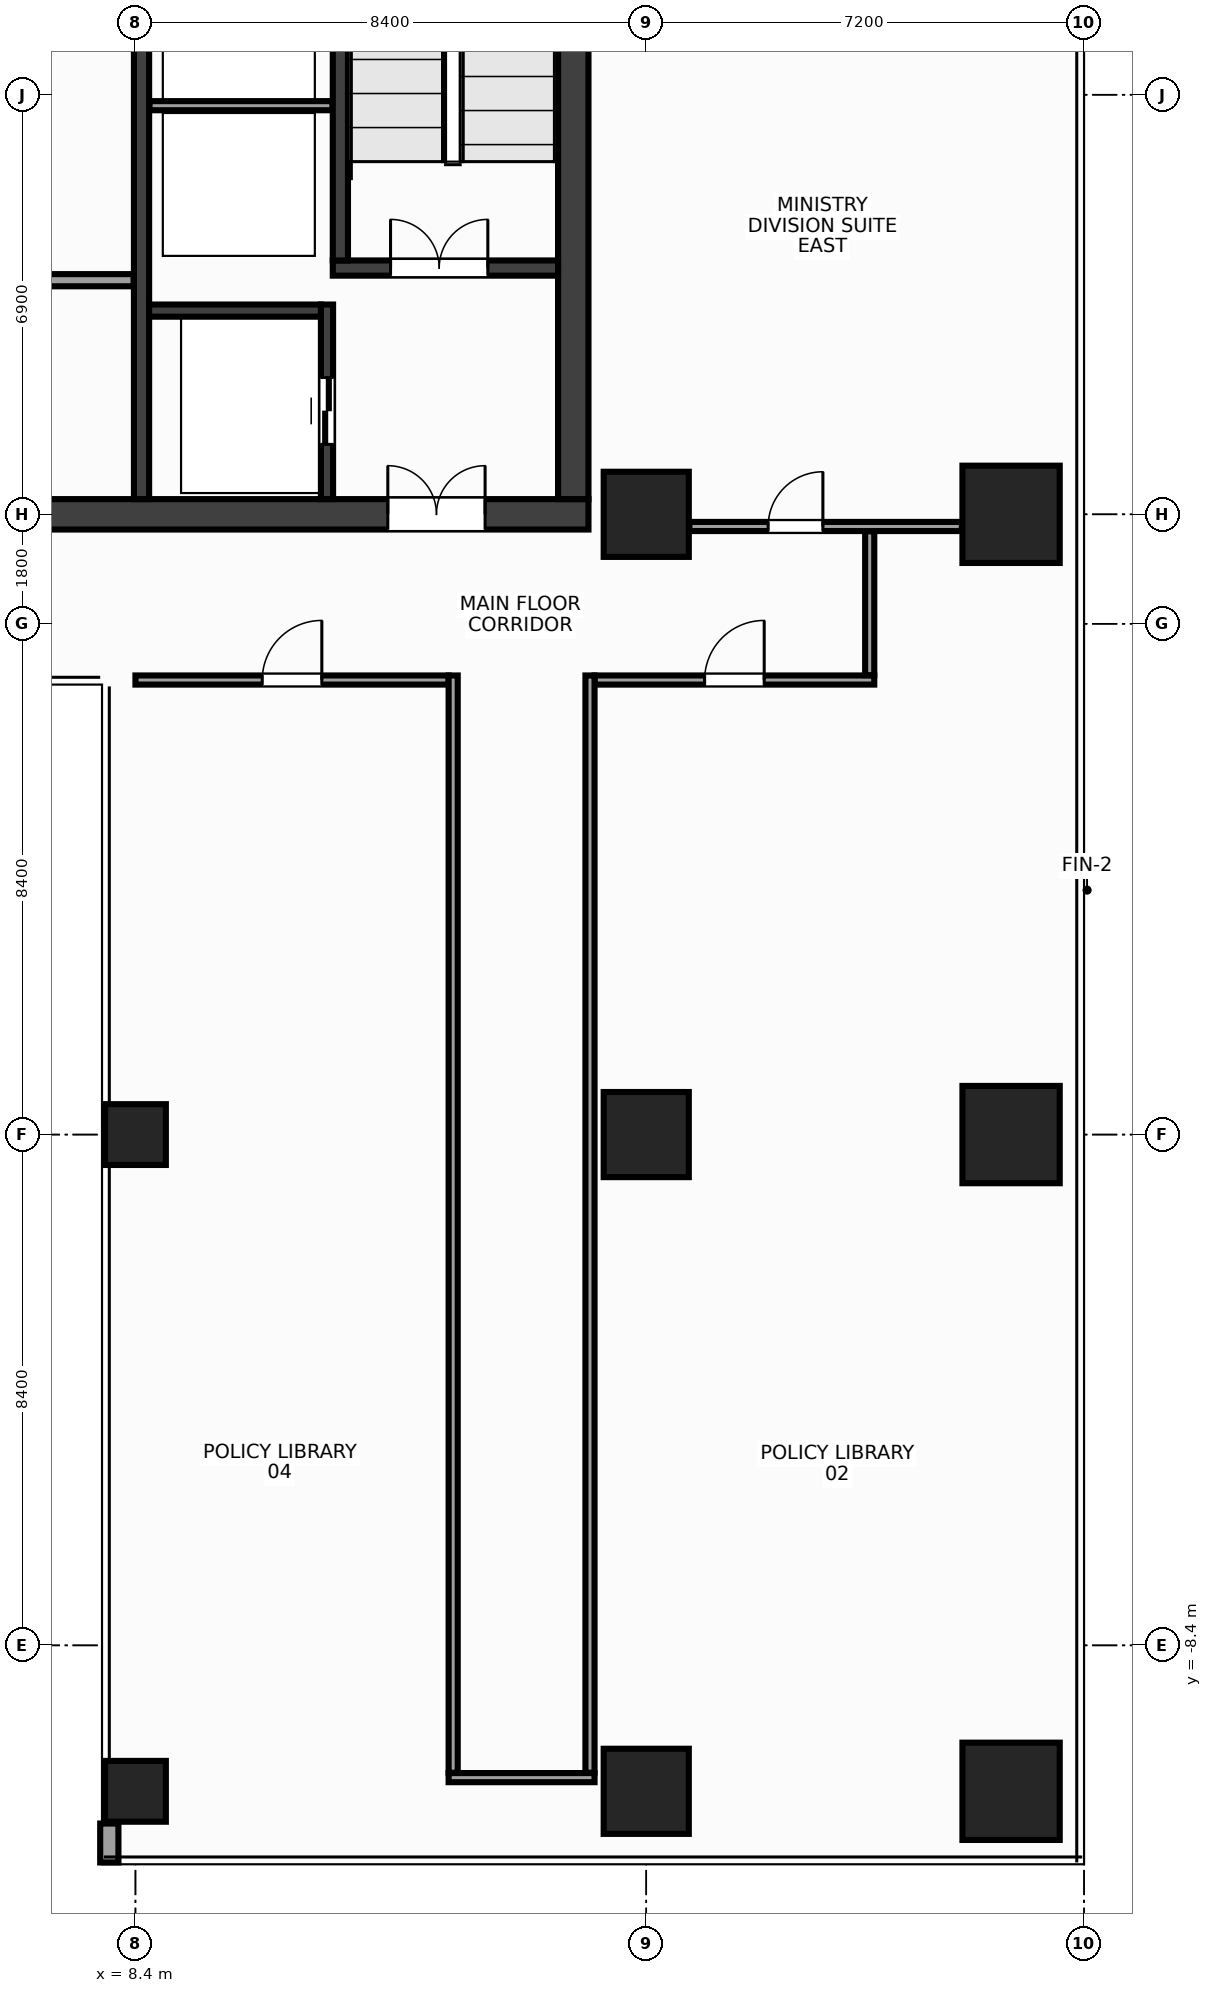
"""IFC4 building model, lengths in metres.
Left out: names, types, materials, properties, quantities, classifications, styles, units other than length and angle.
Written with IfcOpenShell. Run it as: python <this file> out.ifc"""

import sys

from ifc_helpers import new_model, si_unit, direction, frame, frame_2d, origin, origin_2d, place, context, subcontext, project, spatial, rectangle, hollow_rectangle, extrude, source, transform, mapped, element, fill, save


model = new_model("IFC4")
c1 = context("Model", 3, precision=1e-05, world=origin(), true_north=direction((0.0, 1.0)))
c2 = subcontext(c1, "Body", "Model", "MODEL_VIEW")
j1 = project(units=[si_unit("LENGTHUNIT", "METRE"), si_unit("PLANEANGLEUNIT", "RADIAN")], contexts=[c1])
p1 = place(None, origin())
s1 = spatial("IfcSite", under=j1, at=p1, CompositionType="ELEMENT")
p2 = place(p1, origin())
s2 = spatial("IfcBuilding", under=s1, at=p2, CompositionType="ELEMENT")
p3 = place(p2, frame((0.0, 0.0, 210.8)))
s3 = spatial("IfcBuildingStorey", under=s2, at=p3, CompositionType="ELEMENT", Elevation=210.8)
m1 = source(origin(), c2, "Body", "SweptSolid", [
    extrude(rectangle(XDim=31.7, YDim=0.5, at=frame_2d((15.85, 0.0))), origin(), (0.0, 0.0, 1.0), 3.6),
])
p4 = place(p3, frame((-15.85, 10.2, 0.0), z_axis=(0.0, 0.0, 1.0), x_axis=(1.0, 0.0, 0.0)))
e1 = element("IfcWall", 1, at=p4, inside=s3, PredefinedType="SHEAR", context=c2, shape_type="MappedRepresentation", body=[
    mapped(m1, transform((0.0, 0.0, 0.0), x_axis=(1.0, 0.0, 0.0), y_axis=(0.0, 1.0, 0.0), z_axis=(0.0, 0.0, 1.0), scale=1.0)),
])
p5 = place(p4, frame((1.7, 0.0, 0.0)))
e2 = element("IfcOpeningElement", 2, at=p5, cuts=e1, PredefinedType="OPENING", context=c2, shape_type="SweptSolid", body=[
    extrude(rectangle(XDim=1.6, YDim=2.15, at=frame_2d((0.8, 1.075))), frame((0.0, 0.262, 0.0), z_axis=(0.0, -1.0, 0.0), x_axis=(1.0, 0.0, 0.0)), (0.0, 0.0, 1.0), 0.524),
])
p6 = place(p4, frame((28.4, 0.0, 0.0)))
e3 = element("IfcOpeningElement", 3, at=p6, cuts=e1, PredefinedType="OPENING", context=c2, shape_type="SweptSolid", body=[
    extrude(rectangle(XDim=1.6, YDim=2.15, at=frame_2d((0.8, 1.075))), frame((0.0, 0.262, 0.0), z_axis=(0.0, -1.0, 0.0), x_axis=(1.0, 0.0, 0.0)), (0.0, 0.0, 1.0), 0.524),
])
p7 = place(p4, frame((15.1, 0.0, 0.0)))
e4 = element("IfcOpeningElement", 4, at=p7, cuts=e1, PredefinedType="OPENING", context=c2, shape_type="SweptSolid", body=[
    extrude(rectangle(XDim=1.5, YDim=2.2, at=frame_2d((0.75, 1.1))), frame((0.0, 0.262, 0.0), z_axis=(0.0, -1.0, 0.0), x_axis=(1.0, 0.0, 0.0)), (0.0, 0.0, 1.0), 0.524),
])
m2 = source(origin(), c2, "Body", "SweptSolid", [
    extrude(rectangle(XDim=13.1, YDim=0.5, at=frame_2d((6.55, 0.0))), origin(), (0.0, 0.0, 1.0), 3.6),
])
p8 = place(p3, frame((15.6, 10.45, 0.0), z_axis=(0.0, 0.0, 1.0), x_axis=(0.0, 1.0, 0.0)))
e5 = element("IfcWall", 5, at=p8, inside=s3, PredefinedType="SHEAR", context=c2, shape_type="MappedRepresentation", body=[
    mapped(m2, transform((0.0, 0.0, 0.0), x_axis=(1.0, 0.0, 0.0), y_axis=(0.0, 1.0, 0.0), z_axis=(0.0, 0.0, 1.0), scale=1.0)),
])
m3 = source(origin(), c2, "Body", "SweptSolid", [
    extrude(rectangle(XDim=13.1, YDim=0.25, at=frame_2d((6.55, 0.0))), origin(), (0.0, 0.0, 1.0), 3.6),
])
p9 = place(p3, frame((8.5, 10.45, 0.0), z_axis=(0.0, 0.0, 1.0), x_axis=(0.0, 1.0, 0.0)))
e6 = element("IfcWall", 6, at=p9, inside=s3, PredefinedType="SHEAR", context=c2, shape_type="MappedRepresentation", body=[
    mapped(m3, transform((0.0, 0.0, 0.0), x_axis=(1.0, 0.0, 0.0), y_axis=(0.0, 1.0, 0.0), z_axis=(0.0, 0.0, 1.0), scale=1.0)),
])
p10 = place(p9, frame((10.0, 0.0, 0.0)))
e7 = element("IfcOpeningElement", 7, at=p10, cuts=e6, PredefinedType="OPENING", context=c2, shape_type="SweptSolid", body=[
    extrude(rectangle(XDim=0.95, YDim=2.15, at=frame_2d((0.475, 1.075))), frame((0.0, 0.137, 0.0), z_axis=(0.0, -1.0, 0.0), x_axis=(1.0, 0.0, 0.0)), (0.0, 0.0, 1.0), 0.274),
])
m4 = source(origin(), c2, "Body", "SweptSolid", [
    extrude(rectangle(XDim=3.705, YDim=0.25, at=frame_2d((1.853, 0.0))), origin(), (0.0, 0.0, 1.0), 3.6),
])
p11 = place(p3, frame((11.645, 14.25, 0.0), z_axis=(0.0, 0.0, 1.0), x_axis=(1.0, 0.0, 0.0)))
e8 = element("IfcWall", 8, at=p11, inside=s3, PredefinedType="SHEAR", context=c2, shape_type="MappedRepresentation", body=[
    mapped(m4, transform((0.0, 0.0, 0.0), x_axis=(1.0, 0.0, 0.0), y_axis=(0.0, 1.0, 0.0), z_axis=(0.0, 0.0, 1.0), scale=1.0)),
])
p12 = place(p11, frame((0.95, 0.0, 0.0)))
e9 = element("IfcOpeningElement", 9, at=p12, cuts=e8, PredefinedType="OPENING", context=c2, shape_type="SweptSolid", body=[
    extrude(rectangle(XDim=1.6, YDim=2.15, at=frame_2d((0.8, 1.075))), frame((0.0, 0.137, 0.0), z_axis=(0.0, -1.0, 0.0), x_axis=(1.0, 0.0, 0.0)), (0.0, 0.0, 1.0), 0.274),
])
m5 = source(origin(), c2, "Body", "SweptSolid", [
    extrude(rectangle(XDim=9.175, YDim=0.25, at=frame_2d((4.587, 0.0))), origin(), (0.0, 0.0, 1.0), 3.6),
])
p13 = place(p3, frame((11.77, 14.375, 0.0), z_axis=(0.0, 0.0, 1.0), x_axis=(0.0, 1.0, 0.0)))
e10 = element("IfcWall", 10, at=p13, inside=s3, PredefinedType="SHEAR", context=c2, shape_type="MappedRepresentation", body=[
    mapped(m5, transform((0.0, 0.0, 0.0), x_axis=(1.0, 0.0, 0.0), y_axis=(0.0, 1.0, 0.0), z_axis=(0.0, 0.0, 1.0), scale=1.0)),
])
m6 = source(origin(), c2, "Body", "SweptSolid", [
    extrude(rectangle(XDim=3.2, YDim=0.2, at=frame_2d((1.6, 0.0))), origin(), (0.0, 0.0, 1.0), 3.6),
])
p14 = place(p3, frame((11.55, 10.45, 0.0), z_axis=(0.0, 0.0, 1.0), x_axis=(0.0, 1.0, 0.0)))
e11 = element("IfcWall", 11, at=p14, inside=s3, PredefinedType="SHEAR", context=c2, shape_type="MappedRepresentation", body=[
    mapped(m6, transform((0.0, 0.0, 0.0), x_axis=(1.0, 0.0, 0.0), y_axis=(0.0, 1.0, 0.0), z_axis=(0.0, 0.0, 1.0), scale=1.0)),
])
p15 = place(p14, frame((0.9, 0.0, 0.0)))
e12 = element("IfcOpeningElement", 12, at=p15, cuts=e11, PredefinedType="OPENING", context=c2, shape_type="SweptSolid", body=[
    extrude(rectangle(XDim=1.1, YDim=2.15, at=frame_2d((0.55, 1.075))), frame((0.0, 0.112, 0.0), z_axis=(0.0, -1.0, 0.0), x_axis=(1.0, 0.0, 0.0)), (0.0, 0.0, 1.0), 0.224),
])
m7 = source(origin(), c2, "Body", "SweptSolid", [
    extrude(rectangle(XDim=2.825, YDim=0.2, at=frame_2d((1.413, 0.0))), origin(), (0.0, 0.0, 1.0), 3.6),
])
p16 = place(p3, frame((8.625, 13.55, 0.0), z_axis=(0.0, 0.0, 1.0), x_axis=(1.0, 0.0, 0.0)))
e13 = element("IfcWall", 13, at=p16, inside=s3, PredefinedType="SHEAR", context=c2, shape_type="MappedRepresentation", body=[
    mapped(m7, transform((0.0, 0.0, 0.0), x_axis=(1.0, 0.0, 0.0), y_axis=(0.0, 1.0, 0.0), z_axis=(0.0, 0.0, 1.0), scale=1.0)),
])
m8 = source(origin(), c2, "Body", "SweptSolid", [
    extrude(rectangle(XDim=1.4, YDim=1.4, at=origin_2d()), origin(), (0.0, 0.0, 1.0), 3.6),
])
for number, where, z_axis, x_axis in (
    (14, (16.8, -10.8, 0.0), (0.0, 0.0, 1.0), (1.0, 0.0, 0.0)),
    (15, (16.8, 0.0, 0.0), (0.0, 0.0, 1.0), (1.0, 0.0, 0.0)),
    (16, (16.8, 10.2, 0.0), (0.0, 0.0, 1.0), (1.0, 0.0, 0.0)),
):
    element("IfcColumn", number, at=place(p3, frame(where, z_axis=z_axis, x_axis=x_axis)), inside=s3, PredefinedType="COLUMN", context=c2, shape_type="MappedRepresentation", body=[
        mapped(m8, transform((0.0, 0.0, 0.0), x_axis=(1.0, 0.0, 0.0), y_axis=(0.0, 1.0, 0.0), z_axis=(0.0, 0.0, 1.0), scale=1.0)),
    ])
m9 = source(origin(), c2, "Body", "SweptSolid", [
    extrude(rectangle(XDim=1.6, YDim=1.6, at=origin_2d()), origin(), (0.0, 0.0, 1.0), 3.6),
])
for number, where, z_axis, x_axis in (
    (17, (22.8, -10.8, 0.0), (0.0, 0.0, 1.0), (1.0, 0.0, 0.0)),
    (18, (22.8, 0.0, 0.0), (0.0, 0.0, 1.0), (1.0, 0.0, 0.0)),
    (19, (22.8, 10.2, 0.0), (0.0, 0.0, 1.0), (1.0, 0.0, 0.0)),
):
    element("IfcColumn", number, at=place(p3, frame(where, z_axis=z_axis, x_axis=x_axis)), inside=s3, PredefinedType="COLUMN", context=c2, shape_type="MappedRepresentation", body=[
        mapped(m9, transform((0.0, 0.0, 0.0), x_axis=(1.0, 0.0, 0.0), y_axis=(0.0, 1.0, 0.0), z_axis=(0.0, 0.0, 1.0), scale=1.0)),
    ])
m10 = source(origin(), c2, "Body", "SweptSolid", [
    extrude(hollow_rectangle(XDim=1.0, YDim=1.0, WallThickness=0.045, at=origin_2d()), origin(), (0.0, 0.0, 1.0), 3.6),
])
for number, where, z_axis, x_axis in (
    (20, (8.4, 0.0, 0.0), (0.0, 0.0, 1.0), (1.0, 0.0, 0.0)),
    (21, (8.4, -10.8, 0.0), (0.0, 0.0, 1.0), (1.0, 0.0, 0.0)),
):
    element("IfcColumn", number, at=place(p3, frame(where, z_axis=z_axis, x_axis=x_axis)), inside=s3, PredefinedType="COLUMN", context=c2, shape_type="MappedRepresentation", body=[
        mapped(m10, transform((0.0, 0.0, 0.0), x_axis=(1.0, 0.0, 0.0), y_axis=(0.0, 1.0, 0.0), z_axis=(0.0, 0.0, 1.0), scale=1.0)),
    ])
m11 = source(origin(), c2, "Body", "SweptSolid", [
    extrude(rectangle(XDim=0.64, YDim=0.24, at=frame_2d((0.32, 0.0))), origin(), (0.0, 0.0, 1.0), 2.76),
])
p17 = place(p3, frame((7.97, -11.33, 0.0), z_axis=(0.0, 0.0, 1.0), x_axis=(0.0, -1.0, 0.0)))
e22 = element("IfcWall", 22, at=p17, inside=s3, PredefinedType="STANDARD", context=c2, shape_type="MappedRepresentation", body=[
    mapped(m11, transform((0.0, 0.0, 0.0), x_axis=(1.0, 0.0, 0.0), y_axis=(0.0, 1.0, 0.0), z_axis=(0.0, 0.0, 1.0), scale=1.0)),
])
m12 = source(origin(), c2, "Body", "SweptSolid", [
    extrude(rectangle(XDim=3.01, YDim=0.15, at=frame_2d((1.505, 0.0))), origin(), (0.0, 0.0, 1.0), 3.38),
])
p18 = place(p3, frame((8.63, 16.92, 0.0), z_axis=(0.0, 0.0, 1.0), x_axis=(1.0, 0.0, 0.0)))
e23 = element("IfcWall", 23, at=p18, inside=s3, PredefinedType="PARTITIONING", context=c2, shape_type="MappedRepresentation", body=[
    mapped(m12, transform((0.0, 0.0, 0.0), x_axis=(1.0, 0.0, 0.0), y_axis=(0.0, 1.0, 0.0), z_axis=(0.0, 0.0, 1.0), scale=1.0)),
])
m13 = source(origin(), c2, "Body", "SweptSolid", [
    extrude(rectangle(XDim=7.07, YDim=0.2, at=frame_2d((3.535, 0.0))), origin(), (0.0, 0.0, 1.0), 3.38),
])
p19 = place(p3, frame((1.3, 14.05, 0.0), z_axis=(0.0, 0.0, 1.0), x_axis=(1.0, 0.0, 0.0)))
e24 = element("IfcWall", 24, at=p19, inside=s3, PredefinedType="PARTITIONING", context=c2, shape_type="MappedRepresentation", body=[
    mapped(m13, transform((0.0, 0.0, 0.0), x_axis=(1.0, 0.0, 0.0), y_axis=(0.0, 1.0, 0.0), z_axis=(0.0, 0.0, 1.0), scale=1.0)),
])
p20 = place(p19, frame((2.8, 0.0, 0.0)))
e25 = element("IfcOpeningElement", 25, at=p20, cuts=e24, PredefinedType="OPENING", context=c2, shape_type="SweptSolid", body=[
    extrude(rectangle(XDim=0.98, YDim=2.15, at=frame_2d((0.49, 1.075))), frame((0.0, 0.112, 0.0), z_axis=(0.0, -1.0, 0.0), x_axis=(1.0, 0.0, 0.0)), (0.0, 0.0, 1.0), 0.224),
])
m14 = source(origin(), c2, "Body", "SweptSolid", [
    extrude(rectangle(XDim=4.48, YDim=0.15, at=frame_2d((2.24, 0.0))), origin(), (0.0, 0.0, 1.0), 2.915),
])
p21 = place(p3, frame((17.51, 10.0, 0.0), z_axis=(0.0, 0.0, 1.0), x_axis=(1.0, 0.0, 0.0)))
e26 = element("IfcWall", 26, at=p21, inside=s3, PredefinedType="PARTITIONING", context=c2, shape_type="MappedRepresentation", body=[
    mapped(m14, transform((0.0, 0.0, 0.0), x_axis=(1.0, 0.0, 0.0), y_axis=(0.0, 1.0, 0.0), z_axis=(0.0, 0.0, 1.0), scale=1.0)),
])
p22 = place(p21, frame((1.295, 0.0, 0.0)))
e27 = element("IfcOpeningElement", 27, at=p22, cuts=e26, PredefinedType="OPENING", context=c2, shape_type="SweptSolid", body=[
    extrude(rectangle(XDim=0.9, YDim=2.15, at=frame_2d((0.45, 1.075))), frame((0.0, 0.087, 0.0), z_axis=(0.0, -1.0, 0.0), x_axis=(1.0, 0.0, 0.0)), (0.0, 0.0, 1.0), 0.174),
])
m15 = source(origin(), c2, "Body", "SweptSolid", [
    extrude(rectangle(XDim=5.15, YDim=0.15, at=frame_2d((2.575, 0.0))), origin(), (0.0, 0.0, 1.0), 3.38),
])
p23 = place(p3, frame((8.4, 7.475, 0.0), z_axis=(0.0, 0.0, 1.0), x_axis=(1.0, 0.0, 0.0)))
e28 = element("IfcWall", 28, at=p23, inside=s3, PredefinedType="PARTITIONING", context=c2, shape_type="MappedRepresentation", body=[
    mapped(m15, transform((0.0, 0.0, 0.0), x_axis=(1.0, 0.0, 0.0), y_axis=(0.0, 1.0, 0.0), z_axis=(0.0, 0.0, 1.0), scale=1.0)),
])
p24 = place(p23, frame((2.085, 0.0, 0.0)))
e29 = element("IfcOpeningElement", 29, at=p24, cuts=e28, PredefinedType="OPENING", context=c2, shape_type="SweptSolid", body=[
    extrude(rectangle(XDim=0.98, YDim=2.15, at=frame_2d((0.49, 1.075))), frame((0.0, 0.087, 0.0), z_axis=(0.0, -1.0, 0.0), x_axis=(1.0, 0.0, 0.0)), (0.0, 0.0, 1.0), 0.174),
])
m16 = source(origin(), c2, "Body", "SweptSolid", [
    extrude(rectangle(XDim=4.6, YDim=0.15, at=frame_2d((2.3, 0.0))), origin(), (0.0, 0.0, 1.0), 2.765),
])
p25 = place(p3, frame((15.95, 7.475, 0.0), z_axis=(0.0, 0.0, 1.0), x_axis=(1.0, 0.0, 0.0)))
e30 = element("IfcWall", 30, at=p25, inside=s3, PredefinedType="PARTITIONING", context=c2, shape_type="MappedRepresentation", body=[
    mapped(m16, transform((0.0, 0.0, 0.0), x_axis=(1.0, 0.0, 0.0), y_axis=(0.0, 1.0, 0.0), z_axis=(0.0, 0.0, 1.0), scale=1.0)),
])
p26 = place(p25, frame((1.81, 0.0, 0.0)))
e31 = element("IfcOpeningElement", 31, at=p26, cuts=e30, PredefinedType="OPENING", context=c2, shape_type="SweptSolid", body=[
    extrude(rectangle(XDim=0.98, YDim=2.15, at=frame_2d((0.49, 1.075))), frame((0.0, 0.087, 0.0), z_axis=(0.0, -1.0, 0.0), x_axis=(1.0, 0.0, 0.0)), (0.0, 0.0, 1.0), 0.174),
])
m17 = source(origin(), c2, "Body", "SweptSolid", [
    extrude(rectangle(XDim=2.4, YDim=0.15, at=frame_2d((1.2, 0.0))), origin(), (0.0, 0.0, 1.0), 2.915),
])
p27 = place(p3, frame((13.55, -10.575, 0.0), z_axis=(0.0, 0.0, 1.0), x_axis=(1.0, 0.0, 0.0)))
e32 = element("IfcWall", 32, at=p27, inside=s3, PredefinedType="PARTITIONING", context=c2, shape_type="MappedRepresentation", body=[
    mapped(m17, transform((0.0, 0.0, 0.0), x_axis=(1.0, 0.0, 0.0), y_axis=(0.0, 1.0, 0.0), z_axis=(0.0, 0.0, 1.0), scale=1.0)),
])
m18 = source(origin(), c2, "Body", "SweptSolid", [
    extrude(rectangle(XDim=2.365, YDim=0.15, at=frame_2d((1.183, 0.0))), origin(), (0.0, 0.0, 1.0), 3.38),
])
p28 = place(p3, frame((20.475, 7.555, 0.0), z_axis=(0.0, 0.0, 1.0), x_axis=(0.0, 1.0, 0.0)))
e33 = element("IfcWall", 33, at=p28, inside=s3, PredefinedType="PARTITIONING", context=c2, shape_type="MappedRepresentation", body=[
    mapped(m18, transform((0.0, 0.0, 0.0), x_axis=(1.0, 0.0, 0.0), y_axis=(0.0, 1.0, 0.0), z_axis=(0.0, 0.0, 1.0), scale=1.0)),
])
m19 = source(origin(), c2, "Body", "SweptSolid", [
    extrude(rectangle(XDim=18.045, YDim=0.15, at=frame_2d((9.022, 0.0))), origin(), (0.0, 0.0, 1.0), 2.915),
])
for number, where, z_axis, x_axis in (
    (34, (13.625, -10.495, 0.0), (0.0, 0.0, 1.0), (0.0, 1.0, 0.0)),
    (35, (15.875, -10.495, 0.0), (0.0, 0.0, 1.0), (0.0, 1.0, 0.0)),
):
    element("IfcWall", number, at=place(p3, frame(where, z_axis=z_axis, x_axis=x_axis)), inside=s3, PredefinedType="PARTITIONING", context=c2, shape_type="MappedRepresentation", body=[
        mapped(m19, transform((0.0, 0.0, 0.0), x_axis=(1.0, 0.0, 0.0), y_axis=(0.0, 1.0, 0.0), z_axis=(0.0, 0.0, 1.0), scale=1.0)),
    ])
m20 = source(origin(), c2, "Body", "SweptSolid", [
    extrude(rectangle(XDim=1.6, YDim=2.15, at=frame_2d((0.8, 1.075))), frame((0.0, 0.025, 0.0), z_axis=(0.0, -1.0, 0.0), x_axis=(1.0, 0.0, 0.0)), (0.0, 0.0, 1.0), 0.05),
])
p29 = place(p12, origin())
e36 = element("IfcDoor", 36, at=p29, inside=s3, OperationType="DOUBLE_DOOR_SINGLE_SWING", PredefinedType="DOOR", context=c2, shape_type="MappedRepresentation", body=[
    mapped(m20, transform((0.0, 0.0, 0.0), x_axis=(1.0, 0.0, 0.0), y_axis=(0.0, 1.0, 0.0), z_axis=(0.0, 0.0, 1.0), scale=1.0)),
])
fill(e9, e36)
p30 = place(p6, origin())
e37 = element("IfcDoor", 37, at=p30, inside=s3, OperationType="DOUBLE_DOOR_SINGLE_SWING", PredefinedType="DOOR", context=c2, shape_type="MappedRepresentation", body=[
    mapped(m20, transform((0.0, 0.0, 0.0), x_axis=(1.0, 0.0, 0.0), y_axis=(0.0, 1.0, 0.0), z_axis=(0.0, 0.0, 1.0), scale=1.0)),
])
fill(e3, e37)
m21 = source(origin(), c2, "Body", "SweptSolid", [
    extrude(rectangle(XDim=1.1, YDim=2.15, at=frame_2d((0.55, 1.075))), frame((0.0, 0.025, 0.0), z_axis=(0.0, -1.0, 0.0), x_axis=(1.0, 0.0, 0.0)), (0.0, 0.0, 1.0), 0.05),
])
p31 = place(p15, origin())
e38 = element("IfcDoor", 38, at=p31, inside=s3, OperationType="DOUBLE_DOOR_SLIDING", PredefinedType="DOOR", context=c2, shape_type="MappedRepresentation", body=[
    mapped(m21, transform((0.0, 0.0, 0.0), x_axis=(1.0, 0.0, 0.0), y_axis=(0.0, 1.0, 0.0), z_axis=(0.0, 0.0, 1.0), scale=1.0)),
])
fill(e12, e38)
m22 = source(origin(), c2, "Body", "SweptSolid", [
    extrude(rectangle(XDim=0.9, YDim=2.15, at=frame_2d((0.45, 1.075))), frame((0.0, 0.025, 0.0), z_axis=(0.0, -1.0, 0.0), x_axis=(1.0, 0.0, 0.0)), (0.0, 0.0, 1.0), 0.05),
])
p32 = place(p22, origin())
e39 = element("IfcDoor", 39, at=p32, inside=s3, OperationType="SINGLE_SWING_RIGHT", PredefinedType="DOOR", context=c2, shape_type="MappedRepresentation", body=[
    mapped(m22, transform((0.0, 0.0, 0.0), x_axis=(1.0, 0.0, 0.0), y_axis=(0.0, 1.0, 0.0), z_axis=(0.0, 0.0, 1.0), scale=1.0)),
])
fill(e27, e39)
m23 = source(origin(), c2, "Body", "SweptSolid", [
    extrude(rectangle(XDim=0.98, YDim=2.15, at=frame_2d((0.49, 1.075))), frame((0.0, 0.025, 0.0), z_axis=(0.0, -1.0, 0.0), x_axis=(1.0, 0.0, 0.0)), (0.0, 0.0, 1.0), 0.05),
])
p33 = place(p26, origin())
e40 = element("IfcDoor", 40, at=p33, inside=s3, OperationType="SINGLE_SWING_RIGHT", PredefinedType="DOOR", context=c2, shape_type="MappedRepresentation", body=[
    mapped(m23, transform((0.0, 0.0, 0.0), x_axis=(1.0, 0.0, 0.0), y_axis=(0.0, 1.0, 0.0), z_axis=(0.0, 0.0, 1.0), scale=1.0)),
])
fill(e31, e40)
p34 = place(p24, origin())
e41 = element("IfcDoor", 41, at=p34, inside=s3, OperationType="SINGLE_SWING_RIGHT", PredefinedType="DOOR", context=c2, shape_type="MappedRepresentation", body=[
    mapped(m23, transform((0.0, 0.0, 0.0), x_axis=(1.0, 0.0, 0.0), y_axis=(0.0, 1.0, 0.0), z_axis=(0.0, 0.0, 1.0), scale=1.0)),
])
fill(e29, e41)
save(model, sys.argv[1])
